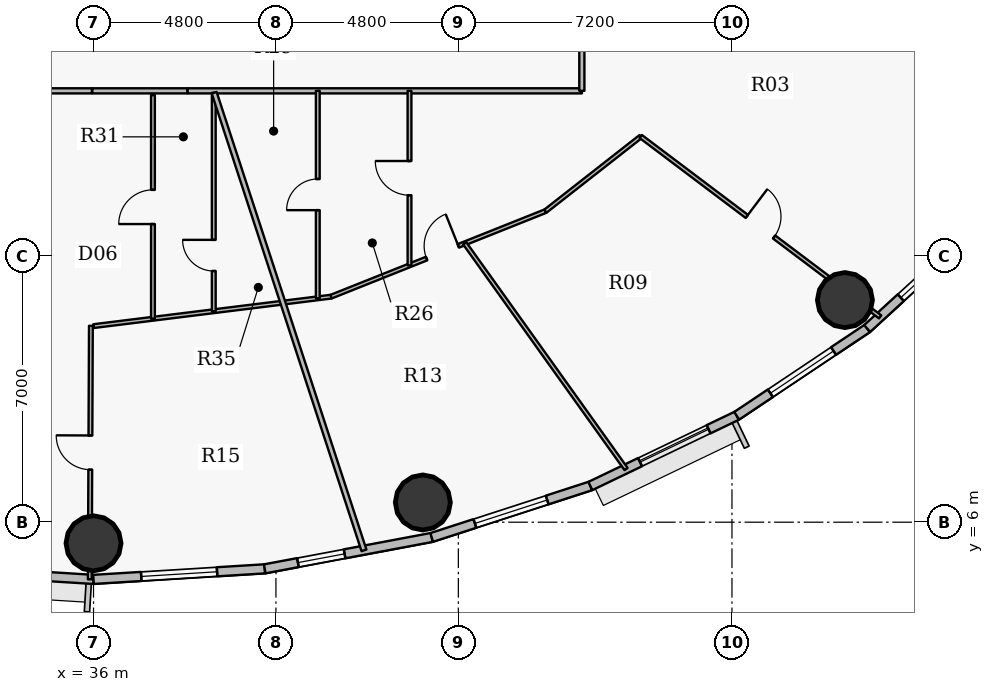
"""IFC4 building model, lengths in metres.
Left out: names, types, materials, properties, quantities, classifications, styles, units other than length and angle.
Written with IfcOpenShell. Run it as: python <this file> out.ifc"""

import sys

from ifc_helpers import new_model, si_unit, direction, frame, frame_2d, origin, origin_2d, place, context, subcontext, project, spatial, rectangle, hollow_circle, extrude, source, transform, mapped, element, fill, save


model = new_model("IFC4")
c1 = context("Model", 3, precision=1e-05, world=origin(), true_north=direction((0.0, 1.0)))
c2 = subcontext(c1, "Body", "Model", "MODEL_VIEW")
j1 = project(units=[si_unit("LENGTHUNIT", "METRE"), si_unit("PLANEANGLEUNIT", "RADIAN")], contexts=[c1])
p1 = place(None, origin())
s1 = spatial("IfcSite", under=j1, at=p1, CompositionType="ELEMENT")
p2 = place(p1, origin())
s2 = spatial("IfcBuilding", under=s1, at=p2, CompositionType="ELEMENT")
p3 = place(p2, frame((0.0, 0.0, 108.45)))
s3 = spatial("IfcBuildingStorey", under=s2, at=p3, CompositionType="ELEMENT", Elevation=108.45)
for number, where, z_axis, x_axis in (
    (1, (36.0, 5.445, 0.0), (0.0, 0.0, 1.0), (1.0, 0.0, 0.0)),
    (2, (44.666, 6.519, 0.0), (0.0, 0.0, 1.0), (1.0, 0.0, 0.0)),
    (3, (55.773, 11.844, 0.0), (0.0, 0.0, 1.0), (1.0, 0.0, 0.0)),
):
    element("IfcColumn", number, at=place(p3, frame(where, z_axis=z_axis, x_axis=x_axis)), inside=s3, PredefinedType="COLUMN", context=c2, shape_type="SweptSolid", body=[
        extrude(hollow_circle(Radius=0.725, WallThickness=0.042, at=origin_2d()), origin(), (0.0, 0.0, 1.0), 3.75),
    ])
p4 = place(p3, frame((36.0, 4.495, 0.0), z_axis=(0.0, 0.0, 1.0), x_axis=(-0.998107531589, 0.061492726276, 0.0)))
e4 = element("IfcWall", 4, at=p4, inside=s3, PredefinedType="SOLIDWALL", context=c2, shape_type="SweptSolid", body=[
    extrude(rectangle(XDim=4.514, YDim=0.24, at=frame_2d((2.257, 0.0))), origin(), (0.0, 0.0, 1.0), 3.5),
])
p5 = place(p4, frame((1.306, 0.0, 0.9)))
e5 = element("IfcOpeningElement", 5, at=p5, cuts=e4, PredefinedType="OPENING", context=c2, shape_type="SweptSolid", body=[
    extrude(rectangle(XDim=2.0, YDim=1.75, at=origin_2d()), frame((1.0, 0.13, 0.875), z_axis=(0.0, -1.0, 0.0), x_axis=(1.0, 0.0, 0.0)), (0.0, 0.0, 1.0), 0.26),
])
p6 = place(p3, frame((40.506, 4.773, 0.0), z_axis=(0.0, 0.0, 1.0), x_axis=(-0.998107531589, -0.061492726276, 0.0)))
e6 = element("IfcWall", 6, at=p6, inside=s3, PredefinedType="SOLIDWALL", context=c2, shape_type="SweptSolid", body=[
    extrude(rectangle(XDim=4.514, YDim=0.24, at=frame_2d((2.257, 0.0))), origin(), (0.0, 0.0, 1.0), 3.5),
])
p7 = place(p6, frame((1.257, 0.0, 0.9)))
e7 = element("IfcOpeningElement", 7, at=p7, cuts=e6, PredefinedType="OPENING", context=c2, shape_type="SweptSolid", body=[
    extrude(rectangle(XDim=2.0, YDim=1.75, at=origin_2d()), frame((1.0, 0.13, 0.875), z_axis=(0.0, -1.0, 0.0), x_axis=(1.0, 0.0, 0.0)), (0.0, 0.0, 1.0), 0.26),
])
p8 = place(p3, frame((44.9, 5.599, 0.0), z_axis=(0.0, 0.0, 1.0), x_axis=(-0.982789252177, -0.184730305596, 0.0)))
e8 = element("IfcWall", 8, at=p8, inside=s3, PredefinedType="SOLIDWALL", context=c2, shape_type="SweptSolid", body=[
    extrude(rectangle(XDim=4.471, YDim=0.24, at=frame_2d((2.235, 0.0))), origin(), (0.0, 0.0, 1.0), 3.5),
])
p9 = place(p8, frame((2.333, 0.0, 0.9)))
e9 = element("IfcOpeningElement", 9, at=p9, cuts=e8, PredefinedType="OPENING", context=c2, shape_type="SweptSolid", body=[
    extrude(rectangle(XDim=1.25, YDim=1.65, at=origin_2d()), frame((0.625, 0.13, 0.825), z_axis=(0.0, -1.0, 0.0), x_axis=(1.0, 0.0, 0.0)), (0.0, 0.0, 1.0), 0.26),
])
p10 = place(p3, frame((49.074, 6.953, 0.0), z_axis=(0.0, 0.0, 1.0), x_axis=(-0.951211346073, -0.308540070495, 0.0)))
e10 = element("IfcWall", 10, at=p10, inside=s3, PredefinedType="SOLIDWALL", context=c2, shape_type="SweptSolid", body=[
    extrude(rectangle(XDim=4.388, YDim=0.24, at=frame_2d((2.194, 0.0))), origin(), (0.0, 0.0, 1.0), 3.5),
])
p11 = place(p10, frame((1.194, 0.0, 0.9)))
e11 = element("IfcOpeningElement", 11, at=p11, cuts=e10, PredefinedType="OPENING", context=c2, shape_type="SweptSolid", body=[
    extrude(rectangle(XDim=2.0, YDim=1.75, at=origin_2d()), frame((1.0, 0.13, 0.875), z_axis=(0.0, -1.0, 0.0), x_axis=(1.0, 0.0, 0.0)), (0.0, 0.0, 1.0), 0.26),
])
p12 = place(p3, frame((52.925, 8.801, 0.0), z_axis=(0.0, 0.0, 1.0), x_axis=(-0.901589935876, -0.432591709962, 0.0)))
e12 = element("IfcWall", 12, at=p12, inside=s3, PredefinedType="SOLIDWALL", context=c2, shape_type="SweptSolid", body=[
    extrude(rectangle(XDim=4.272, YDim=0.24, at=frame_2d((2.136, 0.0))), origin(), (0.0, 0.0, 1.0), 3.5),
])
p13 = place(p12, frame((0.821, 0.0, 0.9)))
e13 = element("IfcOpeningElement", 13, at=p13, cuts=e12, PredefinedType="OPENING", context=c2, shape_type="SweptSolid", body=[
    extrude(rectangle(XDim=2.0, YDim=1.75, at=origin_2d()), frame((1.0, 0.13, 0.875), z_axis=(0.0, -1.0, 0.0), x_axis=(1.0, 0.0, 0.0)), (0.0, 0.0, 1.0), 0.26),
])
p14 = place(p3, frame((56.358, 11.097, 0.0), z_axis=(0.0, 0.0, 1.0), x_axis=(-0.831221811447, -0.555940914284, 0.0)))
e14 = element("IfcWall", 14, at=p14, inside=s3, PredefinedType="SOLIDWALL", context=c2, shape_type="SweptSolid", body=[
    extrude(rectangle(XDim=4.13, YDim=0.24, at=frame_2d((2.065, 0.0))), origin(), (0.0, 0.0, 1.0), 3.5),
])
p15 = place(p14, frame((1.065, 0.0, 0.9)))
e15 = element("IfcOpeningElement", 15, at=p15, cuts=e14, PredefinedType="OPENING", context=c2, shape_type="SweptSolid", body=[
    extrude(rectangle(XDim=2.0, YDim=1.75, at=origin_2d()), frame((1.0, 0.13, 0.875), z_axis=(0.0, -1.0, 0.0), x_axis=(1.0, 0.0, 0.0)), (0.0, 0.0, 1.0), 0.26),
])
p16 = place(p3, frame((59.289, 13.783, 0.0), z_axis=(0.0, 0.0, 1.0), x_axis=(-0.737113356241, -0.675769117414, 0.0)))
e16 = element("IfcWall", 16, at=p16, inside=s3, PredefinedType="SOLIDWALL", context=c2, shape_type="SweptSolid", body=[
    extrude(rectangle(XDim=3.976, YDim=0.24, at=frame_2d((1.988, 0.0))), origin(), (0.0, 0.0, 1.0), 3.5),
])
p17 = place(p16, frame((0.776, 0.0, 0.9)))
e17 = element("IfcOpeningElement", 17, at=p17, cuts=e16, PredefinedType="OPENING", context=c2, shape_type="SweptSolid", body=[
    extrude(rectangle(XDim=2.0, YDim=1.75, at=origin_2d()), frame((1.0, 0.13, 0.875), z_axis=(0.0, -1.0, 0.0), x_axis=(1.0, 0.0, 0.0)), (0.0, 0.0, 1.0), 0.26),
])
p18 = place(p3, frame((23.15, 17.35, 0.0), z_axis=(0.0, 0.0, 1.0), x_axis=(1.0, 0.0, 0.0)))
e18 = element("IfcWall", 18, at=p18, inside=s3, PredefinedType="PARTITIONING", context=c2, shape_type="SweptSolid", body=[
    extrude(rectangle(XDim=12.808, YDim=0.135, at=frame_2d((6.404, 0.0))), origin(), (0.0, 0.0, 1.0), 2.935),
])
p19 = place(p18, frame((8.673, 0.0, 0.0)))
e19 = element("IfcOpeningElement", 19, at=p19, cuts=e18, PredefinedType="OPENING", context=c2, shape_type="SweptSolid", body=[
    extrude(rectangle(XDim=1.0, YDim=2.15, at=origin_2d()), frame((0.5, 0.078, 1.075), z_axis=(0.0, -1.0, 0.0), x_axis=(1.0, 0.0, 0.0)), (0.0, 0.0, 1.0), 0.155),
])
p20 = place(p3, frame((35.902, 4.496, 0.0), z_axis=(0.0, 0.0, 1.0), x_axis=(0.004354785612, 0.999990517876, 0.0)))
e20 = element("IfcWall", 20, at=p20, inside=s3, PredefinedType="PARTITIONING", context=c2, shape_type="SweptSolid", body=[
    extrude(rectangle(XDim=6.671, YDim=0.1, at=frame_2d((3.336, 0.0))), origin(), (0.0, 0.0, 1.0), 2.935),
])
p21 = place(p20, frame((2.886, 0.0, 0.0)))
e21 = element("IfcOpeningElement", 21, at=p21, cuts=e20, PredefinedType="OPENING", context=c2, shape_type="SweptSolid", body=[
    extrude(rectangle(XDim=0.9, YDim=2.1, at=origin_2d()), frame((0.45, 0.06, 1.05), z_axis=(0.0, -1.0, 0.0), x_axis=(1.0, 0.0, 0.0)), (0.0, 0.0, 1.0), 0.12),
])
p22 = place(p3, frame((36.0, 11.159, 0.0), z_axis=(0.0, 0.0, 1.0), x_axis=(0.992395485088, 0.123090215599, 0.0)))
e22 = element("IfcWall", 22, at=p22, inside=s3, PredefinedType="PARTITIONING", context=c2, shape_type="SweptSolid", body=[
    extrude(rectangle(XDim=6.299, YDim=0.1, at=frame_2d((3.15, 0.0))), origin(), (0.0, 0.0, 1.0), 2.935),
])
p23 = place(p3, frame((37.564, 11.353, 0.0), z_axis=(0.0, 0.0, 1.0), x_axis=(0.0, 1.0, 0.0)))
e23 = element("IfcWall", 23, at=p23, inside=s3, PredefinedType="PARTITIONING", context=c2, shape_type="SweptSolid", body=[
    extrude(rectangle(XDim=5.884, YDim=0.1, at=frame_2d((2.942, 0.0))), origin(), (0.0, 0.0, 1.0), 3.125),
])
p24 = place(p23, frame((2.492, 0.0, 0.0)))
e24 = element("IfcOpeningElement", 24, at=p24, cuts=e23, PredefinedType="OPENING", context=c2, shape_type="SweptSolid", body=[
    extrude(rectangle(XDim=0.9, YDim=2.1, at=origin_2d()), frame((0.45, 0.06, 1.05), z_axis=(0.0, -1.0, 0.0), x_axis=(1.0, 0.0, 0.0)), (0.0, 0.0, 1.0), 0.12),
])
p25 = place(p3, frame((38.477, 17.35, 0.0), z_axis=(0.0, 0.0, 1.0), x_axis=(1.0, 0.0, 0.0)))
e25 = element("IfcWall", 25, at=p25, inside=s3, PredefinedType="PARTITIONING", context=c2, shape_type="SweptSolid", body=[
    extrude(rectangle(XDim=10.373, YDim=0.135, at=frame_2d((5.187, 0.0))), origin(), (0.0, 0.0, 1.0), 2.935),
])
p26 = place(p3, frame((39.164, 11.552, 0.0), z_axis=(0.0, 0.0, 1.0), x_axis=(0.0, 1.0, 0.0)))
e26 = element("IfcWall", 26, at=p26, inside=s3, PredefinedType="PARTITIONING", context=c2, shape_type="SweptSolid", body=[
    extrude(rectangle(XDim=5.748, YDim=0.1, at=frame_2d((2.874, 0.0))), origin(), (0.0, 0.0, 1.0), 3.125),
])
p27 = place(p26, frame((1.058, 0.0, 0.0)))
e27 = element("IfcOpeningElement", 27, at=p27, cuts=e26, PredefinedType="OPENING", context=c2, shape_type="SweptSolid", body=[
    extrude(rectangle(XDim=0.82, YDim=2.1, at=origin_2d()), frame((0.41, 0.06, 1.05), z_axis=(0.0, -1.0, 0.0), x_axis=(1.0, 0.0, 0.0)), (0.0, 0.0, 1.0), 0.12),
])
p28 = place(p3, frame((39.175, 17.301, 0.0), z_axis=(0.0, 0.0, 1.0), x_axis=(0.311090320612, -0.95038035145, 0.0)))
e28 = element("IfcWall", 28, at=p28, inside=s3, PredefinedType="PARTITIONING", context=c2, shape_type="SweptSolid", body=[
    extrude(rectangle(XDim=12.671, YDim=0.135, at=frame_2d((6.335, 0.0))), origin(), (0.0, 0.0, 1.0), 2.935),
])
p29 = place(p3, frame((41.901, 11.891, 0.0), z_axis=(0.0, 0.0, 1.0), x_axis=(0.0, 1.0, 0.0)))
e29 = element("IfcWall", 29, at=p29, inside=s3, PredefinedType="PARTITIONING", context=c2, shape_type="SweptSolid", body=[
    extrude(rectangle(XDim=5.459, YDim=0.1, at=frame_2d((2.729, 0.0))), origin(), (0.0, 0.0, 1.0), 2.935),
])
p30 = place(p29, frame((2.32, 0.0, 0.0)))
e30 = element("IfcOpeningElement", 30, at=p30, cuts=e29, PredefinedType="OPENING", context=c2, shape_type="SweptSolid", body=[
    extrude(rectangle(XDim=0.82, YDim=2.1, at=origin_2d()), frame((0.41, 0.06, 1.05), z_axis=(0.0, -1.0, 0.0), x_axis=(1.0, 0.0, 0.0)), (0.0, 0.0, 1.0), 0.12),
])
p31 = place(p3, frame((42.251, 11.934, 0.0), z_axis=(0.0, 0.0, 1.0), x_axis=(0.928803554156, 0.370572473055, 0.0)))
e31 = element("IfcWall", 31, at=p31, inside=s3, PredefinedType="PARTITIONING", context=c2, shape_type="SweptSolid", body=[
    extrude(rectangle(XDim=6.072, YDim=0.1, at=frame_2d((3.036, 0.0))), origin(), (0.0, 0.0, 1.0), 2.935),
])
p32 = place(p31, frame((2.705, 0.0, 0.0)))
e32 = element("IfcOpeningElement", 32, at=p32, cuts=e31, PredefinedType="OPENING", context=c2, shape_type="SweptSolid", body=[
    extrude(rectangle(XDim=0.9, YDim=2.1, at=origin_2d()), frame((0.45, 0.06, 1.05), z_axis=(0.0, -1.0, 0.0), x_axis=(1.0, 0.0, 0.0)), (0.0, 0.0, 1.0), 0.12),
])
p33 = place(p3, frame((44.315, 12.758, 0.0), z_axis=(0.0, 0.0, 1.0), x_axis=(0.0, 1.0, 0.0)))
e33 = element("IfcWall", 33, at=p33, inside=s3, PredefinedType="PARTITIONING", context=c2, shape_type="SweptSolid", body=[
    extrude(rectangle(XDim=4.593, YDim=0.1, at=frame_2d((2.296, 0.0))), origin(), (0.0, 0.0, 1.0), 3.5),
])
p34 = place(p33, frame((1.846, 0.0, 0.0)))
e34 = element("IfcOpeningElement", 34, at=p34, cuts=e33, PredefinedType="OPENING", context=c2, shape_type="SweptSolid", body=[
    extrude(rectangle(XDim=0.9, YDim=2.1, at=origin_2d()), frame((0.45, 0.06, 1.05), z_axis=(0.0, -1.0, 0.0), x_axis=(1.0, 0.0, 0.0)), (0.0, 0.0, 1.0), 0.12),
])
p35 = place(p3, frame((45.768, 13.337, 0.0), z_axis=(0.0, 0.0, 1.0), x_axis=(0.581582931767, -0.813487119429, 0.0)))
e35 = element("IfcWall", 35, at=p35, inside=s3, PredefinedType="PARTITIONING", context=c2, shape_type="SweptSolid", body=[
    extrude(rectangle(XDim=7.301, YDim=0.1, at=frame_2d((3.65, 0.0))), origin(), (0.0, 0.0, 1.0), 2.935),
])
p36 = place(p3, frame((47.891, 14.184, 0.0), z_axis=(0.0, 0.0, 1.0), x_axis=(0.787351391371, 0.616504490256, 0.0)))
e36 = element("IfcWall", 36, at=p36, inside=s3, PredefinedType="PARTITIONING", context=c2, shape_type="SweptSolid", body=[
    extrude(rectangle(XDim=3.187, YDim=0.1, at=frame_2d((1.593, 0.0))), origin(), (0.0, 0.0, 1.0), 2.935),
])
p37 = place(p3, frame((48.85, 17.35, 0.0), z_axis=(0.0, 0.0, 1.0), x_axis=(0.0, 1.0, 0.0)))
e37 = element("IfcWall", 37, at=p37, inside=s3, PredefinedType="PARTITIONING", context=c2, shape_type="SweptSolid", body=[
    extrude(rectangle(XDim=19.3, YDim=0.135, at=frame_2d((9.65, 0.0))), origin(), (0.0, 0.0, 1.0), 2.935),
])
p38 = place(p37, frame((4.107, 0.0, 0.0)))
e38 = element("IfcOpeningElement", 38, at=p38, cuts=e37, PredefinedType="OPENING", context=c2, shape_type="SweptSolid", body=[
    extrude(rectangle(XDim=1.0, YDim=2.15, at=origin_2d()), frame((0.5, 0.078, 1.075), z_axis=(0.0, -1.0, 0.0), x_axis=(1.0, 0.0, 0.0)), (0.0, 0.0, 1.0), 0.155),
])
p39 = place(p37, frame((13.717, 0.0, 0.0)))
e39 = element("IfcOpeningElement", 39, at=p39, cuts=e37, PredefinedType="OPENING", context=c2, shape_type="SweptSolid", body=[
    extrude(rectangle(XDim=1.0, YDim=2.15, at=origin_2d()), frame((0.5, 0.078, 1.075), z_axis=(0.0, -1.0, 0.0), x_axis=(1.0, 0.0, 0.0)), (0.0, 0.0, 1.0), 0.155),
])
p40 = place(p3, frame((50.4, 16.149, 0.0), z_axis=(0.0, 0.0, 1.0), x_axis=(0.79862729849, -0.601825920102, 0.0)))
e40 = element("IfcWall", 40, at=p40, inside=s3, PredefinedType="PARTITIONING", context=c2, shape_type="SweptSolid", body=[
    extrude(rectangle(XDim=7.887, YDim=0.1, at=frame_2d((3.944, 0.0))), origin(), (0.0, 0.0, 1.0), 2.935),
])
p41 = place(p40, frame((3.494, 0.0, 0.0)))
e41 = element("IfcOpeningElement", 41, at=p41, cuts=e40, PredefinedType="OPENING", context=c2, shape_type="SweptSolid", body=[
    extrude(rectangle(XDim=0.9, YDim=2.1, at=origin_2d()), frame((0.45, 0.06, 1.05), z_axis=(0.0, -1.0, 0.0), x_axis=(1.0, 0.0, 0.0)), (0.0, 0.0, 1.0), 0.12),
])
p42 = place(p3, frame((54.214, 20.528, 0.0), z_axis=(0.0, 0.0, 1.0), x_axis=(0.942277402903, -0.334833236073, 0.0)))
e42 = element("IfcWall", 42, at=p42, inside=s3, PredefinedType="PARTITIONING", context=c2, shape_type="SweptSolid", body=[
    extrude(rectangle(XDim=8.408, YDim=0.1, at=frame_2d((4.204, 0.0))), origin(), (0.0, 0.0, 1.0), 2.935),
])
p43 = place(p42, frame((3.754, 0.0, 0.0)))
e43 = element("IfcOpeningElement", 43, at=p43, cuts=e42, PredefinedType="OPENING", context=c2, shape_type="SweptSolid", body=[
    extrude(rectangle(XDim=0.9, YDim=2.1, at=origin_2d()), frame((0.45, 0.06, 1.05), z_axis=(0.0, -1.0, 0.0), x_axis=(1.0, 0.0, 0.0)), (0.0, 0.0, 1.0), 0.12),
])
p44 = place(p3, frame((38.467, 17.35, 0.0), z_axis=(0.0, 0.0, 1.0), x_axis=(-1.0, 0.0, 0.0)))
e44 = element("IfcWall", 44, at=p44, inside=s3, PredefinedType="PARTITIONING", context=c2, shape_type="SweptSolid", body=[
    extrude(rectangle(XDim=2.499, YDim=0.135, at=frame_2d((1.25, 0.0))), origin(), (0.0, 0.0, 1.0), 2.935),
])
m1 = source(origin(), c2, "Body", "SweptSolid", [
    extrude(rectangle(XDim=2.0, YDim=1.75, at=origin_2d()), frame((1.0, 0.03, 0.875), z_axis=(0.0, -1.0, 0.0), x_axis=(1.0, 0.0, 0.0)), (0.0, 0.0, 1.0), 0.06),
])
p45 = place(p7, origin())
e45 = element("IfcWindow", 45, at=p45, inside=s3, PartitioningType="DOUBLE_PANEL_VERTICAL", PredefinedType="WINDOW", context=c2, shape_type="MappedRepresentation", body=[
    mapped(m1, transform((0.0, 0.0, 0.0), x_axis=(1.0, 0.0, 0.0), y_axis=(0.0, 1.0, 0.0), z_axis=(0.0, 0.0, 1.0), scale=1.0)),
])
fill(e7, e45)
m2 = source(origin(), c2, "Body", "SweptSolid", [
    extrude(rectangle(XDim=1.25, YDim=1.65, at=origin_2d()), frame((0.625, 0.03, 0.825), z_axis=(0.0, -1.0, 0.0), x_axis=(1.0, 0.0, 0.0)), (0.0, 0.0, 1.0), 0.06),
])
p46 = place(p9, origin())
e46 = element("IfcWindow", 46, at=p46, inside=s3, PartitioningType="SINGLE_PANEL", PredefinedType="WINDOW", context=c2, shape_type="MappedRepresentation", body=[
    mapped(m2, transform((0.0, 0.0, 0.0), x_axis=(1.0, 0.0, 0.0), y_axis=(0.0, 1.0, 0.0), z_axis=(0.0, 0.0, 1.0), scale=1.0)),
])
fill(e9, e46)
p47 = place(p11, origin())
e47 = element("IfcWindow", 47, at=p47, inside=s3, PartitioningType="DOUBLE_PANEL_VERTICAL", PredefinedType="WINDOW", context=c2, shape_type="MappedRepresentation", body=[
    mapped(m1, transform((0.0, 0.0, 0.0), x_axis=(1.0, 0.0, 0.0), y_axis=(0.0, 1.0, 0.0), z_axis=(0.0, 0.0, 1.0), scale=1.0)),
])
fill(e11, e47)
p48 = place(p13, origin())
e48 = element("IfcWindow", 48, at=p48, inside=s3, PartitioningType="DOUBLE_PANEL_VERTICAL", PredefinedType="WINDOW", context=c2, shape_type="MappedRepresentation", body=[
    mapped(m1, transform((0.0, 0.0, 0.0), x_axis=(1.0, 0.0, 0.0), y_axis=(0.0, 1.0, 0.0), z_axis=(0.0, 0.0, 1.0), scale=1.0)),
])
fill(e13, e48)
p49 = place(p15, origin())
e49 = element("IfcWindow", 49, at=p49, inside=s3, PartitioningType="DOUBLE_PANEL_VERTICAL", PredefinedType="WINDOW", context=c2, shape_type="MappedRepresentation", body=[
    mapped(m1, transform((0.0, 0.0, 0.0), x_axis=(1.0, 0.0, 0.0), y_axis=(0.0, 1.0, 0.0), z_axis=(0.0, 0.0, 1.0), scale=1.0)),
])
fill(e15, e49)
p50 = place(p17, origin())
e50 = element("IfcWindow", 50, at=p50, inside=s3, PartitioningType="DOUBLE_PANEL_VERTICAL", PredefinedType="WINDOW", context=c2, shape_type="MappedRepresentation", body=[
    mapped(m1, transform((0.0, 0.0, 0.0), x_axis=(1.0, 0.0, 0.0), y_axis=(0.0, 1.0, 0.0), z_axis=(0.0, 0.0, 1.0), scale=1.0)),
])
fill(e17, e50)
m3 = source(origin(), c2, "Body", "SweptSolid", [
    extrude(rectangle(XDim=0.9, YDim=2.1, at=origin_2d()), frame((0.45, 0.025, 1.05), z_axis=(0.0, -1.0, 0.0), x_axis=(1.0, 0.0, 0.0)), (0.0, 0.0, 1.0), 0.05),
])
p51 = place(p21, origin())
e51 = element("IfcDoor", 51, at=p51, inside=s3, OperationType="SINGLE_SWING_RIGHT", PredefinedType="DOOR", context=c2, shape_type="MappedRepresentation", body=[
    mapped(m3, transform((0.0, 0.0, 0.0), x_axis=(1.0, 0.0, 0.0), y_axis=(0.0, 1.0, 0.0), z_axis=(0.0, 0.0, 1.0), scale=1.0)),
])
fill(e21, e51)
p52 = place(p24, origin())
e52 = element("IfcDoor", 52, at=p52, inside=s3, OperationType="SINGLE_SWING_LEFT", PredefinedType="DOOR", context=c2, shape_type="MappedRepresentation", body=[
    mapped(m3, transform((0.0, 0.0, 0.0), x_axis=(1.0, 0.0, 0.0), y_axis=(0.0, 1.0, 0.0), z_axis=(0.0, 0.0, 1.0), scale=1.0)),
])
fill(e24, e52)
m4 = source(origin(), c2, "Body", "SweptSolid", [
    extrude(rectangle(XDim=0.82, YDim=2.1, at=origin_2d()), frame((0.41, 0.025, 1.05), z_axis=(0.0, -1.0, 0.0), x_axis=(1.0, 0.0, 0.0)), (0.0, 0.0, 1.0), 0.05),
])
p53 = place(p27, origin())
e53 = element("IfcDoor", 53, at=p53, inside=s3, OperationType="SINGLE_SWING_RIGHT", PredefinedType="DOOR", context=c2, shape_type="MappedRepresentation", body=[
    mapped(m4, transform((0.0, 0.0, 0.0), x_axis=(1.0, 0.0, 0.0), y_axis=(0.0, 1.0, 0.0), z_axis=(0.0, 0.0, 1.0), scale=1.0)),
])
fill(e27, e53)
p54 = place(p32, origin())
e54 = element("IfcDoor", 54, at=p54, inside=s3, OperationType="SINGLE_SWING_RIGHT", PredefinedType="DOOR", context=c2, shape_type="MappedRepresentation", body=[
    mapped(m3, transform((0.0, 0.0, 0.0), x_axis=(1.0, 0.0, 0.0), y_axis=(0.0, 1.0, 0.0), z_axis=(0.0, 0.0, 1.0), scale=1.0)),
])
fill(e32, e54)
p55 = place(p41, origin())
e55 = element("IfcDoor", 55, at=p55, inside=s3, OperationType="SINGLE_SWING_LEFT", PredefinedType="DOOR", context=c2, shape_type="MappedRepresentation", body=[
    mapped(m3, transform((0.0, 0.0, 0.0), x_axis=(1.0, 0.0, 0.0), y_axis=(0.0, 1.0, 0.0), z_axis=(0.0, 0.0, 1.0), scale=1.0)),
])
fill(e41, e55)
p56 = place(p34, origin())
e56 = element("IfcDoor", 56, at=p56, inside=s3, OperationType="SINGLE_SWING_RIGHT", PredefinedType="DOOR", context=c2, shape_type="MappedRepresentation", body=[
    mapped(m3, transform((0.0, 0.0, 0.0), x_axis=(1.0, 0.0, 0.0), y_axis=(0.0, 1.0, 0.0), z_axis=(0.0, 0.0, 1.0), scale=1.0)),
])
fill(e34, e56)
p57 = place(p30, origin())
e57 = element("IfcDoor", 57, at=p57, inside=s3, OperationType="SINGLE_SWING_LEFT", PredefinedType="DOOR", context=c2, shape_type="MappedRepresentation", body=[
    mapped(m4, transform((0.0, 0.0, 0.0), x_axis=(1.0, 0.0, 0.0), y_axis=(0.0, 1.0, 0.0), z_axis=(0.0, 0.0, 1.0), scale=1.0)),
])
fill(e30, e57)
save(model, sys.argv[1])
